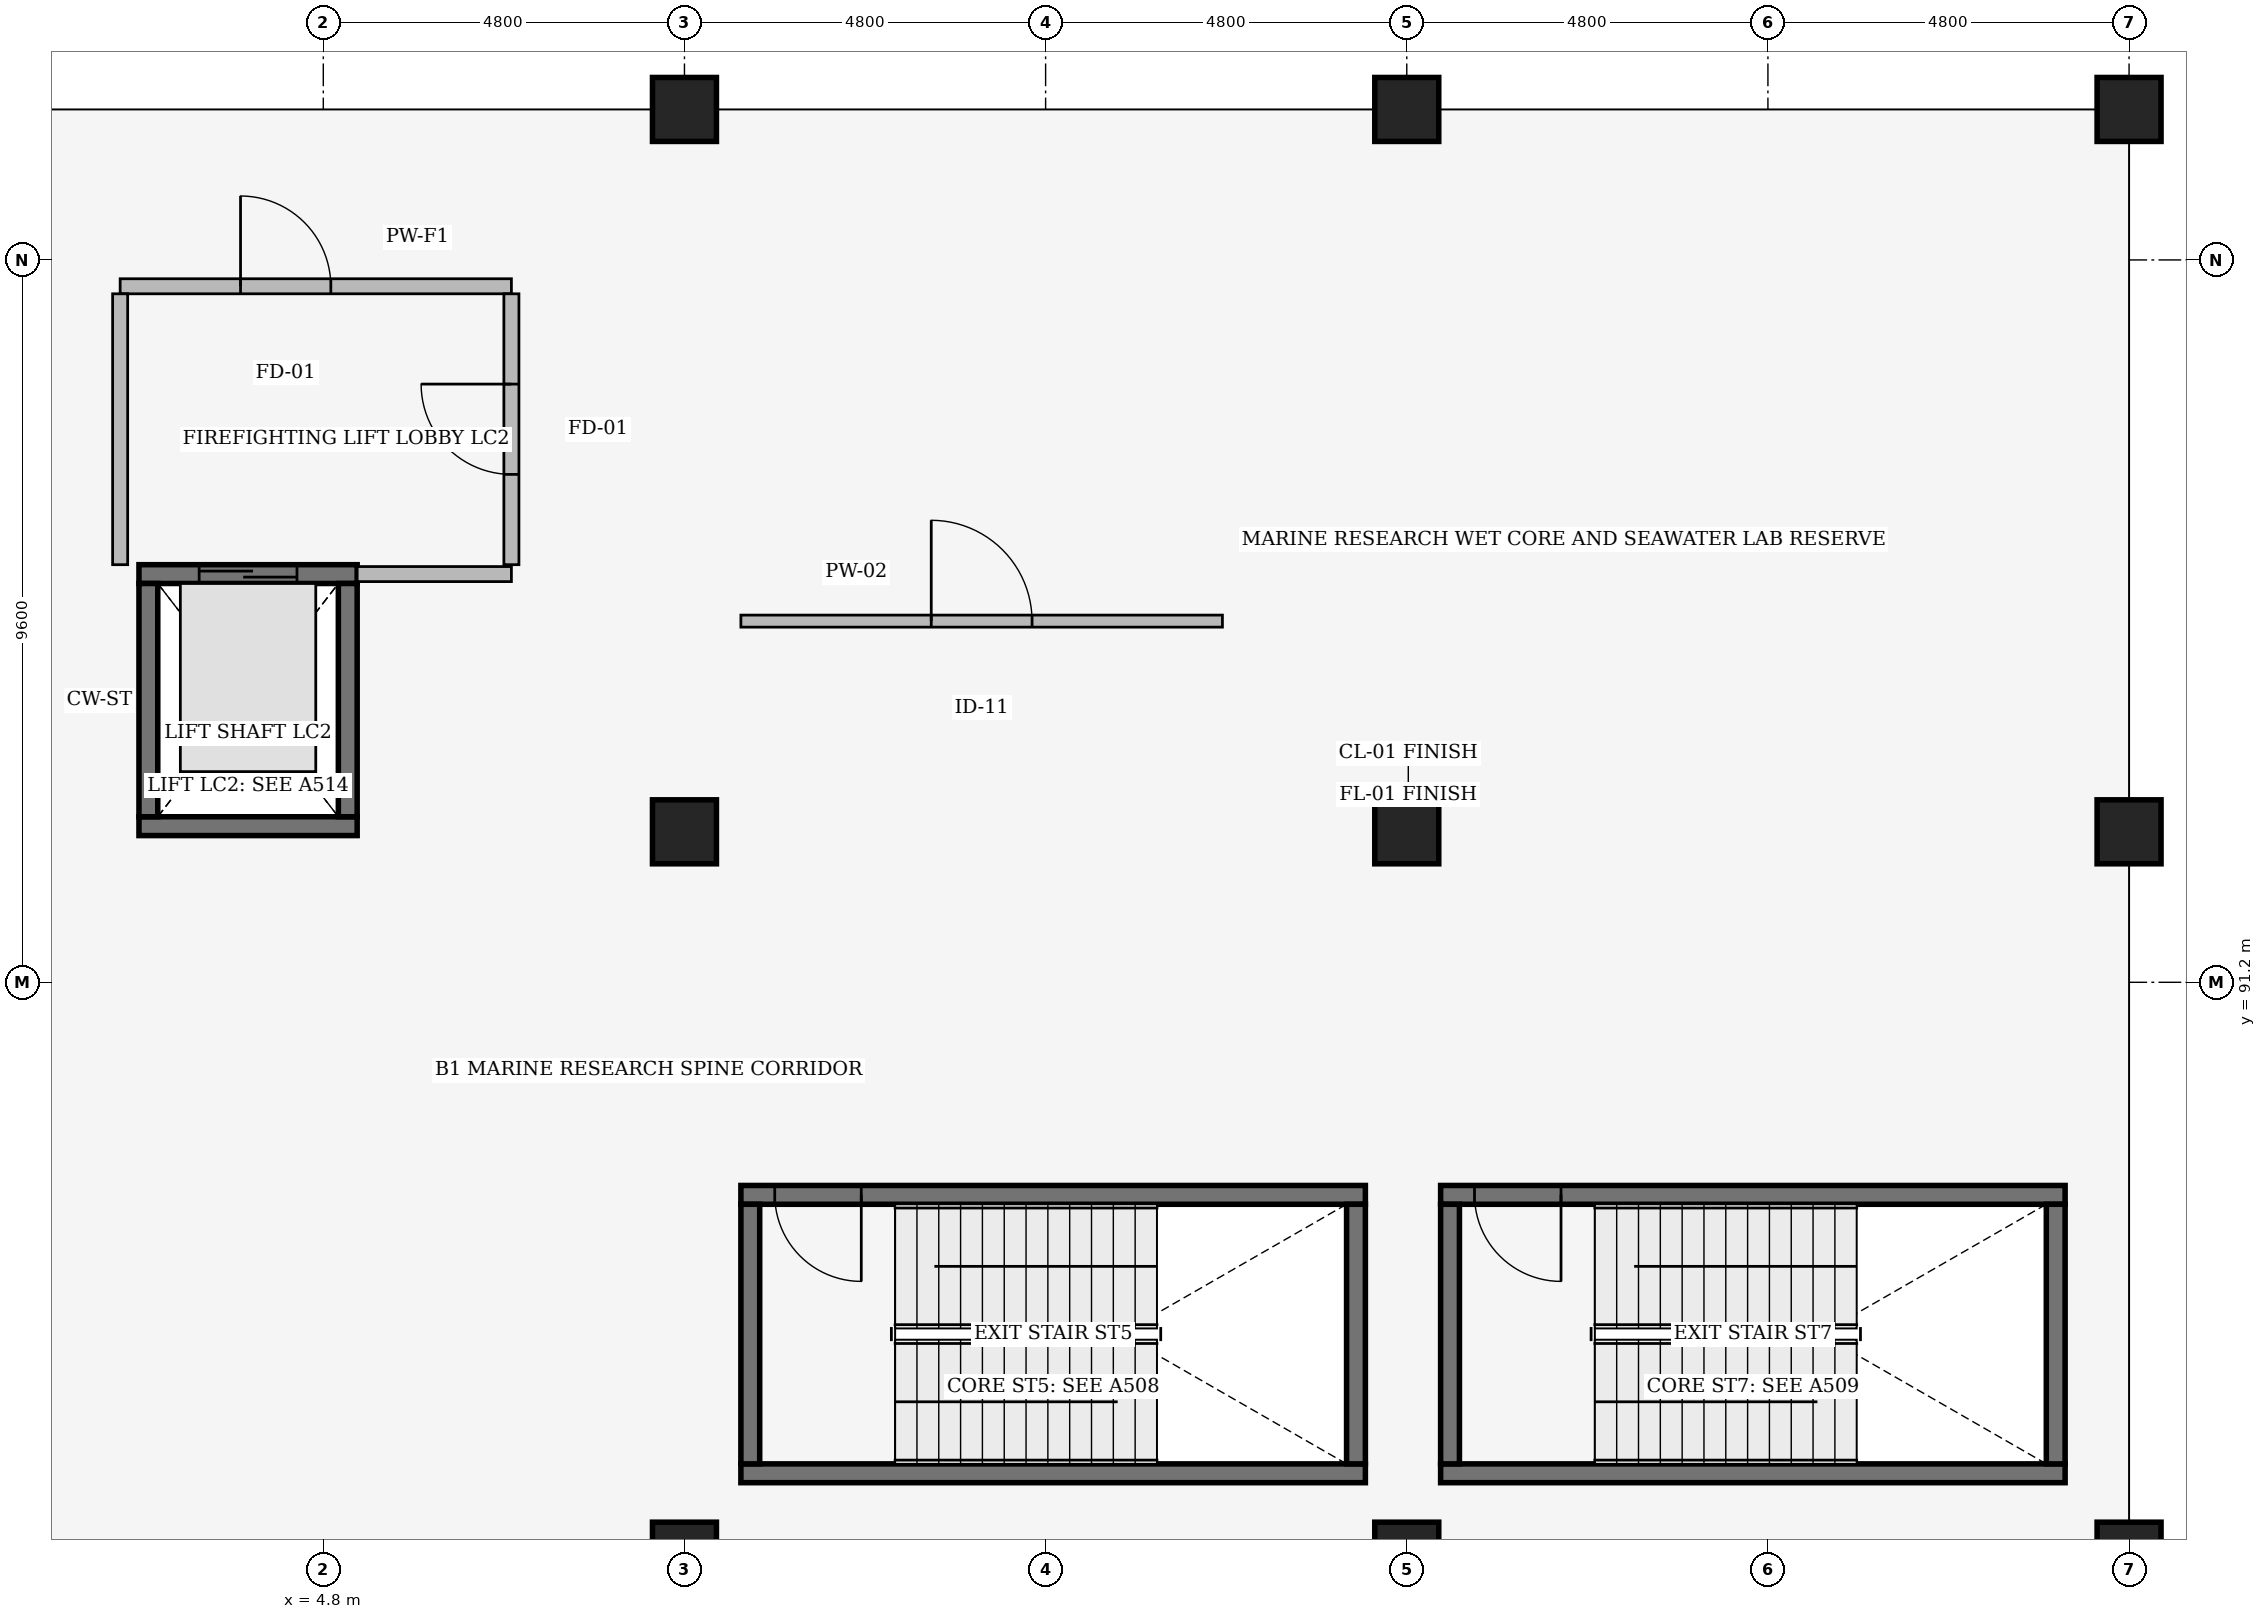
"""IFC4 building model, lengths in metres.
Left out: names, types, materials, properties, quantities, classifications, styles, units other than length and angle.
Written with IfcOpenShell. Run it as: python <this file> out.ifc"""

import sys

from ifc_helpers import new_model, si_unit, direction, frame, frame_2d, origin, origin_2d, place, context, subcontext, project, spatial, rectangle, extrude, element, fill, save


model = new_model("IFC4")
c1 = context("Model", 3, precision=1e-05, world=origin(), true_north=direction((0.0, 1.0)))
c2 = subcontext(c1, "Body", "Model", "MODEL_VIEW")
j1 = project(units=[si_unit("LENGTHUNIT", "METRE"), si_unit("PLANEANGLEUNIT", "RADIAN")], contexts=[c1])
p1 = place(None, origin())
s1 = spatial("IfcSite", under=j1, at=p1, CompositionType="ELEMENT")
p2 = place(p1, origin())
s2 = spatial("IfcBuilding", under=s1, at=p2, CompositionType="ELEMENT")
p3 = place(p2, frame((0.0, 0.0, -4.8)))
s3 = spatial("IfcBuildingStorey", under=s2, at=p3, CompositionType="ELEMENT", Elevation=-4.8)
for number, where, z_axis, x_axis in (
    (1, (9.6, 83.6, 0.0), (0.0, 0.0, 1.0), (1.0, 0.0, 0.0)),
    (2, (9.6, 93.2, 0.0), (0.0, 0.0, 1.0), (1.0, 0.0, 0.0)),
    (3, (9.6, 102.8, 0.0), (0.0, 0.0, 1.0), (1.0, 0.0, 0.0)),
    (4, (19.2, 83.6, 0.0), (0.0, 0.0, 1.0), (1.0, 0.0, 0.0)),
    (5, (19.2, 93.2, 0.0), (0.0, 0.0, 1.0), (1.0, 0.0, 0.0)),
    (6, (19.2, 102.8, 0.0), (0.0, 0.0, 1.0), (1.0, 0.0, 0.0)),
    (7, (28.8, 83.6, 0.0), (0.0, 0.0, 1.0), (1.0, 0.0, 0.0)),
    (8, (28.8, 93.2, 0.0), (0.0, 0.0, 1.0), (1.0, 0.0, 0.0)),
    (9, (28.8, 102.8, 0.0), (0.0, 0.0, 1.0), (1.0, 0.0, 0.0)),
):
    element("IfcColumn", number, at=place(p3, frame(where, z_axis=z_axis, x_axis=x_axis)), inside=s3, PredefinedType="COLUMN", context=c2, shape_type="SweptSolid", body=[
        extrude(rectangle(XDim=0.85, YDim=0.85, at=origin_2d()), origin(), (0.0, 0.0, 1.0), 4.8),
    ])
p4 = place(p3, frame((10.35, 84.675, 0.0), z_axis=(0.0, 0.0, 1.0), x_axis=(1.0, 0.0, 0.0)))
e10 = element("IfcWall", 10, at=p4, inside=s3, PredefinedType="SHEAR", context=c2, shape_type="SweptSolid", body=[
    extrude(rectangle(XDim=8.3, YDim=0.25, at=frame_2d((4.15, 0.0))), origin(), (0.0, 0.0, 1.0), 4.5),
])
p5 = place(p3, frame((18.65, 88.375, 0.0), z_axis=(0.0, 0.0, 1.0), x_axis=(-1.0, 0.0, 0.0)))
e11 = element("IfcWall", 11, at=p5, inside=s3, PredefinedType="SHEAR", context=c2, shape_type="SweptSolid", body=[
    extrude(rectangle(XDim=8.3, YDim=0.25, at=frame_2d((4.15, 0.0))), origin(), (0.0, 0.0, 1.0), 4.5),
])
p6 = place(p5, frame((7.85, 0.0, 0.0), z_axis=(0.0, 0.0, 1.0), x_axis=(-1.0, 0.0, 0.0)))
e12 = element("IfcOpeningElement", 12, at=p6, cuts=e11, PredefinedType="OPENING", context=c2, shape_type="SweptSolid", body=[
    extrude(rectangle(XDim=1.15, YDim=2.2, at=frame_2d((0.575, 1.1))), frame((0.0, 0.135, 0.0), z_axis=(0.0, -1.0, 0.0), x_axis=(1.0, 0.0, 0.0)), (0.0, 0.0, 1.0), 0.27),
])
for number, where, z_axis, x_axis in (
    (13, (10.475, 88.25, 0.0), (0.0, 0.0, 1.0), (0.0, -1.0, 0.0)),
    (14, (18.525, 84.8, 0.0), (0.0, 0.0, 1.0), (0.0, 1.0, 0.0)),
):
    element("IfcWall", number, at=place(p3, frame(where, z_axis=z_axis, x_axis=x_axis)), inside=s3, PredefinedType="SHEAR", context=c2, shape_type="SweptSolid", body=[
        extrude(rectangle(XDim=3.45, YDim=0.25, at=frame_2d((1.725, 0.0))), origin(), (0.0, 0.0, 1.0), 4.5),
    ])
p7 = place(p3, frame((19.65, 84.675, 0.0), z_axis=(0.0, 0.0, 1.0), x_axis=(1.0, 0.0, 0.0)))
e15 = element("IfcWall", 15, at=p7, inside=s3, PredefinedType="SHEAR", context=c2, shape_type="SweptSolid", body=[
    extrude(rectangle(XDim=8.3, YDim=0.25, at=frame_2d((4.15, 0.0))), origin(), (0.0, 0.0, 1.0), 4.5),
])
p8 = place(p3, frame((27.95, 88.375, 0.0), z_axis=(0.0, 0.0, 1.0), x_axis=(-1.0, 0.0, 0.0)))
e16 = element("IfcWall", 16, at=p8, inside=s3, PredefinedType="SHEAR", context=c2, shape_type="SweptSolid", body=[
    extrude(rectangle(XDim=8.3, YDim=0.25, at=frame_2d((4.15, 0.0))), origin(), (0.0, 0.0, 1.0), 4.5),
])
p9 = place(p8, frame((7.85, 0.0, 0.0), z_axis=(0.0, 0.0, 1.0), x_axis=(-1.0, 0.0, 0.0)))
e17 = element("IfcOpeningElement", 17, at=p9, cuts=e16, PredefinedType="OPENING", context=c2, shape_type="SweptSolid", body=[
    extrude(rectangle(XDim=1.15, YDim=2.2, at=frame_2d((0.575, 1.1))), frame((0.0, 0.135, 0.0), z_axis=(0.0, -1.0, 0.0), x_axis=(1.0, 0.0, 0.0)), (0.0, 0.0, 1.0), 0.27),
])
for number, where, z_axis, x_axis in (
    (18, (19.775, 88.25, 0.0), (0.0, 0.0, 1.0), (0.0, -1.0, 0.0)),
    (19, (27.825, 84.8, 0.0), (0.0, 0.0, 1.0), (0.0, 1.0, 0.0)),
):
    element("IfcWall", number, at=place(p3, frame(where, z_axis=z_axis, x_axis=x_axis)), inside=s3, PredefinedType="SHEAR", context=c2, shape_type="SweptSolid", body=[
        extrude(rectangle(XDim=3.45, YDim=0.25, at=frame_2d((1.725, 0.0))), origin(), (0.0, 0.0, 1.0), 4.5),
    ])
p10 = place(p3, frame((2.35, 93.275, 0.0), z_axis=(0.0, 0.0, 1.0), x_axis=(1.0, 0.0, 0.0)))
e20 = element("IfcWall", 20, at=p10, inside=s3, PredefinedType="SHEAR", context=c2, shape_type="SweptSolid", body=[
    extrude(rectangle(XDim=2.9, YDim=0.25, at=frame_2d((1.45, 0.0))), origin(), (0.0, 0.0, 1.0), 4.5),
])
p11 = place(p3, frame((2.35, 96.625, 0.0), z_axis=(0.0, 0.0, 1.0), x_axis=(1.0, 0.0, 0.0)))
e21 = element("IfcWall", 21, at=p11, inside=s3, PredefinedType="SHEAR", context=c2, shape_type="SweptSolid", body=[
    extrude(rectangle(XDim=2.9, YDim=0.25, at=frame_2d((1.45, 0.0))), origin(), (0.0, 0.0, 1.0), 4.5),
])
p12 = place(p11, frame((0.8, 0.0, 0.0)))
e22 = element("IfcOpeningElement", 22, at=p12, cuts=e21, PredefinedType="OPENING", context=c2, shape_type="SweptSolid", body=[
    extrude(rectangle(XDim=1.3, YDim=2.2, at=frame_2d((0.65, 1.1))), frame((0.0, 0.135, 0.0), z_axis=(0.0, -1.0, 0.0), x_axis=(1.0, 0.0, 0.0)), (0.0, 0.0, 1.0), 0.27),
])
for number, where, z_axis, x_axis in (
    (23, (2.475, 93.4, 0.0), (0.0, 0.0, 1.0), (0.0, 1.0, 0.0)),
    (24, (5.125, 93.4, 0.0), (0.0, 0.0, 1.0), (0.0, 1.0, 0.0)),
):
    element("IfcWall", number, at=place(p3, frame(where, z_axis=z_axis, x_axis=x_axis)), inside=s3, PredefinedType="SHEAR", context=c2, shape_type="SweptSolid", body=[
        extrude(rectangle(XDim=3.1, YDim=0.25, at=frame_2d((1.55, 0.0))), origin(), (0.0, 0.0, 1.0), 4.5),
    ])
p13 = place(p3, frame((2.1, 100.45, 0.0), z_axis=(0.0, 0.0, 1.0), x_axis=(1.0, 0.0, 0.0)))
e25 = element("IfcWall", 25, at=p13, inside=s3, PredefinedType="PARTITIONING", context=c2, shape_type="SweptSolid", body=[
    extrude(rectangle(XDim=5.2, YDim=0.2, at=frame_2d((2.6, 0.0))), origin(), (0.0, 0.0, 1.0), 4.214),
])
p14 = place(p13, frame((1.6, 0.0, 0.0)))
e26 = element("IfcOpeningElement", 26, at=p14, cuts=e25, PredefinedType="OPENING", context=c2, shape_type="SweptSolid", body=[
    extrude(rectangle(XDim=1.2, YDim=2.2, at=frame_2d((0.6, 1.1))), frame((0.0, 0.11, 0.0), z_axis=(0.0, -1.0, 0.0), x_axis=(1.0, 0.0, 0.0)), (0.0, 0.0, 1.0), 0.22),
])
p15 = place(p3, frame((2.1, 96.75, 0.0), z_axis=(0.0, 0.0, 1.0), x_axis=(0.0, 1.0, 0.0)))
e27 = element("IfcWall", 27, at=p15, inside=s3, PredefinedType="PARTITIONING", context=c2, shape_type="SweptSolid", body=[
    extrude(rectangle(XDim=3.6, YDim=0.2, at=frame_2d((1.8, 0.0))), origin(), (0.0, 0.0, 1.0), 4.156),
])
p16 = place(p3, frame((7.3, 96.75, 0.0), z_axis=(0.0, 0.0, 1.0), x_axis=(0.0, 1.0, 0.0)))
e28 = element("IfcWall", 28, at=p16, inside=s3, PredefinedType="PARTITIONING", context=c2, shape_type="SweptSolid", body=[
    extrude(rectangle(XDim=3.6, YDim=0.2, at=frame_2d((1.8, 0.0))), origin(), (0.0, 0.0, 1.0), 4.156),
])
p17 = place(p16, frame((1.2, 0.0, 0.0)))
e29 = element("IfcOpeningElement", 29, at=p17, cuts=e28, PredefinedType="OPENING", context=c2, shape_type="SweptSolid", body=[
    extrude(rectangle(XDim=1.2, YDim=2.2, at=frame_2d((0.6, 1.1))), frame((0.0, 0.11, 0.0), z_axis=(0.0, -1.0, 0.0), x_axis=(1.0, 0.0, 0.0)), (0.0, 0.0, 1.0), 0.22),
])
p18 = place(p3, frame((5.25, 96.625, 0.0), z_axis=(0.0, 0.0, 1.0), x_axis=(1.0, 0.0, 0.0)))
e30 = element("IfcWall", 30, at=p18, inside=s3, PredefinedType="PARTITIONING", context=c2, shape_type="SweptSolid", body=[
    extrude(rectangle(XDim=2.05, YDim=0.2, at=frame_2d((1.025, 0.0))), origin(), (0.0, 0.0, 1.0), 4.44),
])
p19 = place(p3, frame((10.35, 96.0, 0.0), z_axis=(0.0, 0.0, 1.0), x_axis=(1.0, 0.0, 0.0)))
e31 = element("IfcWall", 31, at=p19, inside=s3, PredefinedType="PARTITIONING", context=c2, shape_type="SweptSolid", body=[
    extrude(rectangle(XDim=6.4, YDim=0.16, at=frame_2d((3.2, 0.0))), origin(), (0.0, 0.0, 1.0), 4.049),
])
p20 = place(p19, frame((2.53, 0.0, 0.0)))
e32 = element("IfcOpeningElement", 32, at=p20, cuts=e31, PredefinedType="OPENING", context=c2, shape_type="SweptSolid", body=[
    extrude(rectangle(XDim=1.34, YDim=2.28, at=frame_2d((0.67, 1.14))), frame((0.0, 0.09, 0.0), z_axis=(0.0, -1.0, 0.0), x_axis=(1.0, 0.0, 0.0)), (0.0, 0.0, 1.0), 0.18),
])
p21 = place(p6, origin())
e33 = element("IfcDoor", 33, at=p21, inside=s3, OperationType="SINGLE_SWING_RIGHT", PredefinedType="DOOR", context=c2, shape_type="SweptSolid", body=[
    extrude(rectangle(XDim=1.15, YDim=2.2, at=frame_2d((0.575, 1.1))), frame((0.0, 0.025, 0.0), z_axis=(0.0, -1.0, 0.0), x_axis=(1.0, 0.0, 0.0)), (0.0, 0.0, 1.0), 0.05),
])
fill(e12, e33)
p22 = place(p9, origin())
e34 = element("IfcDoor", 34, at=p22, inside=s3, OperationType="SINGLE_SWING_RIGHT", PredefinedType="DOOR", context=c2, shape_type="SweptSolid", body=[
    extrude(rectangle(XDim=1.15, YDim=2.2, at=frame_2d((0.575, 1.1))), frame((0.0, 0.025, 0.0), z_axis=(0.0, -1.0, 0.0), x_axis=(1.0, 0.0, 0.0)), (0.0, 0.0, 1.0), 0.05),
])
fill(e17, e34)
p23 = place(p12, origin())
e35 = element("IfcDoor", 35, at=p23, inside=s3, OperationType="DOUBLE_DOOR_SLIDING", PredefinedType="DOOR", context=c2, shape_type="SweptSolid", body=[
    extrude(rectangle(XDim=1.3, YDim=2.2, at=frame_2d((0.65, 1.1))), frame((0.0, 0.025, 0.0), z_axis=(0.0, -1.0, 0.0), x_axis=(1.0, 0.0, 0.0)), (0.0, 0.0, 1.0), 0.05),
])
fill(e22, e35)
p24 = place(p17, origin())
e36 = element("IfcDoor", 36, at=p24, inside=s3, OperationType="SINGLE_SWING_RIGHT", PredefinedType="DOOR", context=c2, shape_type="SweptSolid", body=[
    extrude(rectangle(XDim=1.2, YDim=2.2, at=frame_2d((0.6, 1.1))), frame((0.0, 0.025, 0.0), z_axis=(0.0, -1.0, 0.0), x_axis=(1.0, 0.0, 0.0)), (0.0, 0.0, 1.0), 0.05),
])
fill(e29, e36)
p25 = place(p14, origin())
e37 = element("IfcDoor", 37, at=p25, inside=s3, OperationType="SINGLE_SWING_LEFT", PredefinedType="DOOR", context=c2, shape_type="SweptSolid", body=[
    extrude(rectangle(XDim=1.2, YDim=2.2, at=frame_2d((0.6, 1.1))), frame((0.0, 0.025, 0.0), z_axis=(0.0, -1.0, 0.0), x_axis=(1.0, 0.0, 0.0)), (0.0, 0.0, 1.0), 0.05),
])
fill(e26, e37)
p26 = place(p20, origin())
e38 = element("IfcDoor", 38, at=p26, inside=s3, OperationType="SINGLE_SWING_LEFT", PredefinedType="DOOR", context=c2, shape_type="SweptSolid", body=[
    extrude(rectangle(XDim=1.34, YDim=2.28, at=frame_2d((0.67, 1.14))), frame((0.0, 0.025, 0.0), z_axis=(0.0, -1.0, 0.0), x_axis=(1.0, 0.0, 0.0)), (0.0, 0.0, 1.0), 0.05),
])
fill(e32, e38)
save(model, sys.argv[1])
